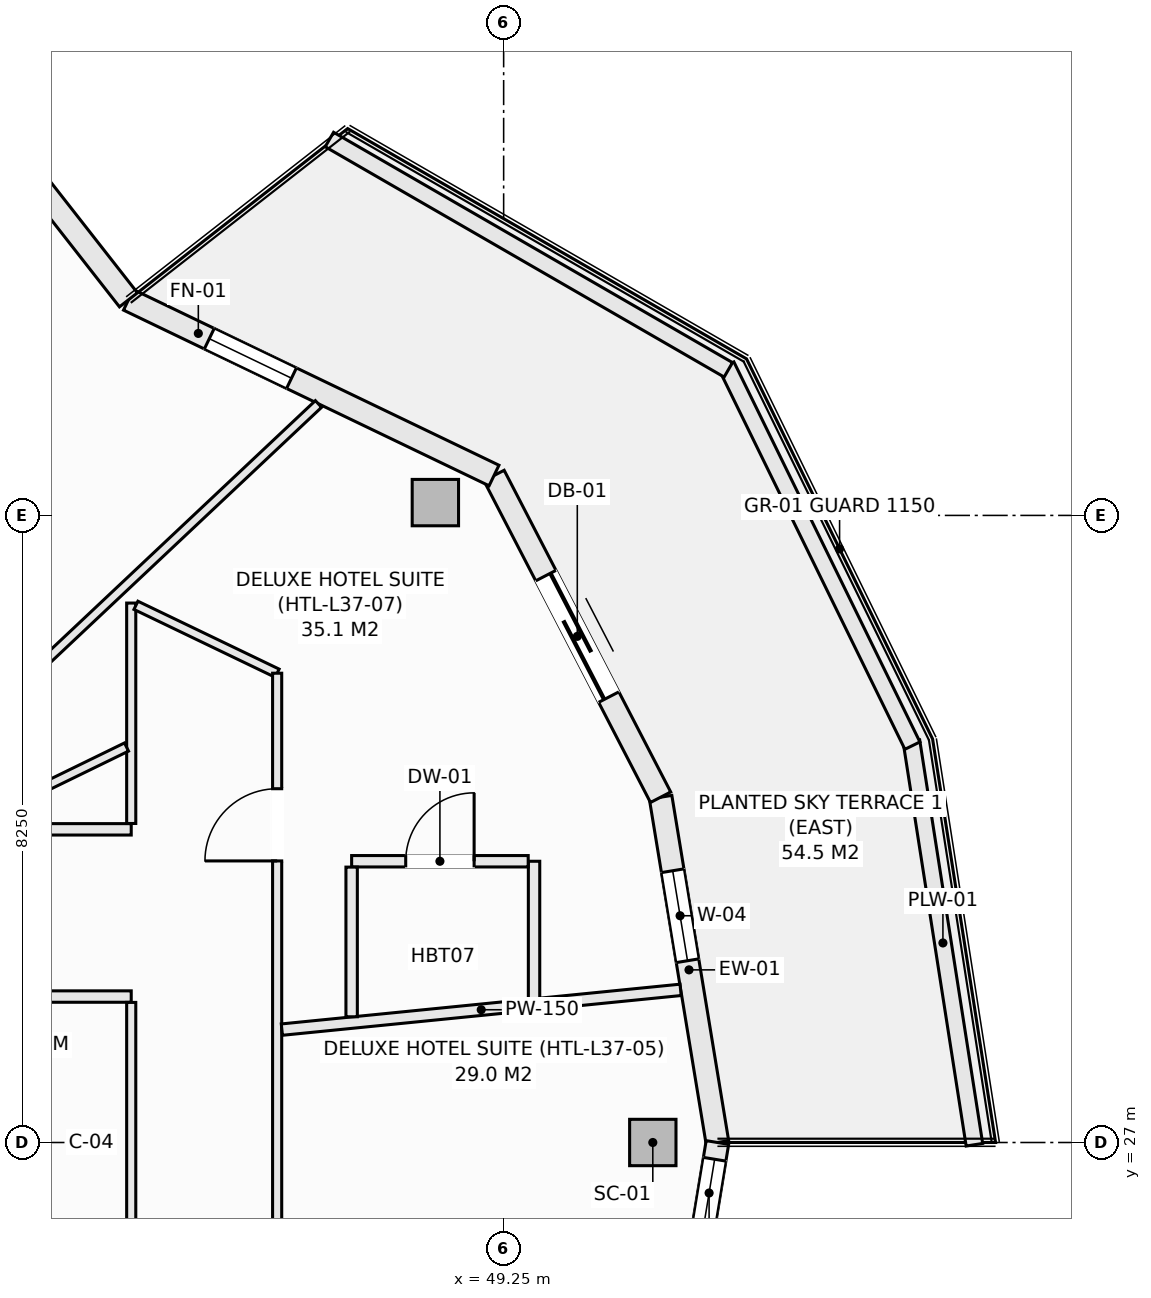
"""IFC4 building model, lengths in metres.
Left out: names, types, materials, properties, quantities, classifications, styles, units other than length and angle.
Written with IfcOpenShell. Run it as: python <this file> out.ifc"""

import sys

from ifc_helpers import new_model, si_unit, direction, frame, frame_2d, origin, origin_2d, place, context, subcontext, project, spatial, rectangle, hollow_rectangle, extrude, element, fill, save


model = new_model("IFC4")
c1 = context("Model", 3, precision=1e-05, world=origin(), true_north=direction((0.0, 1.0)))
c2 = subcontext(c1, "Body", "Model", "MODEL_VIEW")
j1 = project(units=[si_unit("LENGTHUNIT", "METRE"), si_unit("PLANEANGLEUNIT", "RADIAN")], contexts=[c1])
p1 = place(None, origin())
s1 = spatial("IfcSite", under=j1, at=p1, CompositionType="ELEMENT")
p2 = place(p1, origin())
s2 = spatial("IfcBuilding", under=s1, at=p2, CompositionType="ELEMENT")
p3 = place(p2, frame((0.0, 0.0, 146.1)))
s3 = spatial("IfcBuildingStorey", under=s2, at=p3, CompositionType="ELEMENT", Elevation=146.1)
for number, where, z_axis, x_axis in (
    (1, (51.212, 27.0, -0.27), (0.0, 0.0, 1.0), (1.0, 0.0, 0.0)),
    (2, (48.352, 35.419, -0.27), (0.0, 0.0, 1.0), (1.0, 0.0, 0.0)),
):
    element("IfcColumn", number, at=place(p3, frame(where, z_axis=z_axis, x_axis=x_axis)), inside=s3, PredefinedType="COLUMN", context=c2, shape_type="SweptSolid", body=[
        extrude(hollow_rectangle(XDim=0.61, YDim=0.61, WallThickness=0.025, at=origin_2d()), origin(), (0.0, 0.0, 1.0), 3.4),
    ])
p4 = place(p3, frame((51.315, 31.542, 0.0), z_axis=(0.0, 0.0, 1.0), x_axis=(0.162394765401, -0.986725868806, 0.0)))
e3 = element("IfcWall", 3, at=p4, inside=s3, PredefinedType="SOLIDWALL", context=c2, shape_type="SweptSolid", body=[
    extrude(rectangle(XDim=4.603, YDim=0.3, at=frame_2d((2.302, 0.0))), origin(), (0.0, 0.0, 1.0), 2.653),
])
p5 = place(p4, frame((0.98, 0.0, 0.72)))
e4 = element("IfcOpeningElement", 4, at=p5, cuts=e3, PredefinedType="OPENING", context=c2, shape_type="SweptSolid", body=[
    extrude(rectangle(XDim=1.2, YDim=1.65, at=frame_2d((0.6, 0.825))), frame((0.0, 0.16, 0.0), z_axis=(0.0, -1.0, 0.0), x_axis=(1.0, 0.0, 0.0)), (0.0, 0.0, 1.0), 0.32),
])
p6 = place(p3, frame((49.123, 35.775, 0.0), z_axis=(0.0, 0.0, 1.0), x_axis=(0.459810251451, -0.888017191647, 0.0)))
e5 = element("IfcWall", 5, at=p6, inside=s3, PredefinedType="SOLIDWALL", context=c2, shape_type="SweptSolid", body=[
    extrude(rectangle(XDim=4.766, YDim=0.3, at=frame_2d((2.383, 0.0))), origin(), (0.0, 0.0, 1.0), 2.653),
])
p7 = place(p6, frame((1.483, 0.0, 0.0)))
e6 = element("IfcOpeningElement", 6, at=p7, cuts=e5, PredefinedType="OPENING", context=c2, shape_type="SweptSolid", body=[
    extrude(rectangle(XDim=1.8, YDim=2.25, at=frame_2d((0.9, 1.125))), frame((0.0, 0.16, 0.0), z_axis=(0.0, -1.0, 0.0), x_axis=(1.0, 0.0, 0.0)), (0.0, 0.0, 1.0), 0.32),
])
p8 = place(p3, frame((44.313, 38.086, 0.0), z_axis=(0.0, 0.0, 1.0), x_axis=(0.901353070301, -0.433085029363, 0.0)))
e7 = element("IfcWall", 7, at=p8, inside=s3, PredefinedType="SOLIDWALL", context=c2, shape_type="SweptSolid", body=[
    extrude(rectangle(XDim=5.336, YDim=0.3, at=frame_2d((2.668, 0.0))), origin(), (0.0, 0.0, 1.0), 2.653),
])
p9 = place(p8, frame((1.18, 0.0, 0.72)))
e8 = element("IfcOpeningElement", 8, at=p9, cuts=e7, PredefinedType="OPENING", context=c2, shape_type="SweptSolid", body=[
    extrude(rectangle(XDim=1.2, YDim=1.65, at=frame_2d((0.6, 0.825))), frame((0.0, 0.16, 0.0), z_axis=(0.0, -1.0, 0.0), x_axis=(1.0, 0.0, 0.0)), (0.0, 0.0, 1.0), 0.32),
])
p10 = place(p3, frame((41.094, 42.199, 0.0), z_axis=(0.0, 0.0, 1.0), x_axis=(0.616429245738, -0.787410302828, 0.0)))
e9 = element("IfcWall", 9, at=p10, inside=s3, PredefinedType="SOLIDWALL", context=c2, shape_type="SweptSolid", body=[
    extrude(rectangle(XDim=5.223, YDim=0.3, at=frame_2d((2.612, 0.0))), origin(), (0.0, 0.0, 1.0), 2.653),
])
p11 = place(p10, frame((1.18, 0.0, 0.72)))
e10 = element("IfcOpeningElement", 10, at=p11, cuts=e9, PredefinedType="OPENING", context=c2, shape_type="SweptSolid", body=[
    extrude(rectangle(XDim=1.2, YDim=1.65, at=frame_2d((0.6, 0.825))), frame((0.0, 0.16, 0.0), z_axis=(0.0, -1.0, 0.0), x_axis=(1.0, 0.0, 0.0)), (0.0, 0.0, 1.0), 0.32),
])
p12 = place(p3, frame((51.315, 22.458, 0.0), z_axis=(0.0, 0.0, 1.0), x_axis=(0.162394765401, 0.986725868806, 0.0)))
e11 = element("IfcWall", 11, at=p12, inside=s3, PredefinedType="SOLIDWALL", context=c2, shape_type="SweptSolid", body=[
    extrude(rectangle(XDim=4.603, YDim=0.3, at=frame_2d((2.302, 0.0))), origin(), (0.0, 0.0, 1.0), 2.653),
])
p13 = place(p12, frame((1.68, 0.0, 0.74)))
e12 = element("IfcOpeningElement", 12, at=p13, cuts=e11, PredefinedType="OPENING", context=c2, shape_type="SweptSolid", body=[
    extrude(rectangle(XDim=1.2, YDim=1.7, at=frame_2d((0.6, 0.85))), frame((0.0, 0.16, 0.0), z_axis=(0.0, -1.0, 0.0), x_axis=(1.0, 0.0, 0.0)), (0.0, 0.0, 1.0), 0.32),
])
p14 = place(p12, frame((3.48, 0.0, 0.72)))
e13 = element("IfcOpeningElement", 13, at=p14, cuts=e11, PredefinedType="OPENING", context=c2, shape_type="SweptSolid", body=[
    extrude(rectangle(XDim=0.9, YDim=1.65, at=frame_2d((0.45, 0.825))), frame((0.0, 0.16, 0.0), z_axis=(0.0, -1.0, 0.0), x_axis=(1.0, 0.0, 0.0)), (0.0, 0.0, 1.0), 0.32),
])
p15 = place(p3, frame((54.615, 32.28, 0.0), z_axis=(0.0, 0.0, 1.0), x_axis=(0.154245214003, -0.988032597619, 0.0)))
e14 = element("IfcWall", 14, at=p15, inside=s3, PredefinedType="PARAPET", context=c2, shape_type="SweptSolid", body=[
    extrude(rectangle(XDim=5.374, YDim=0.22, at=frame_2d((2.687, 0.0))), origin(), (0.0, 0.0, 1.0), 0.52),
])
p16 = place(p3, frame((52.18, 37.221, 0.0), z_axis=(0.0, 0.0, 1.0), x_axis=(0.439637174641, -0.898175458735, 0.0)))
e15 = element("IfcWall", 15, at=p16, inside=s3, PredefinedType="PARAPET", context=c2, shape_type="SweptSolid", body=[
    extrude(rectangle(XDim=5.567, YDim=0.22, at=frame_2d((2.784, 0.0))), origin(), (0.0, 0.0, 1.0), 0.52),
])
p17 = place(p3, frame((46.958, 40.195, 0.0), z_axis=(0.0, 0.0, 1.0), x_axis=(0.866058128659, -0.499943314571, 0.0)))
e16 = element("IfcWall", 16, at=p17, inside=s3, PredefinedType="PARAPET", context=c2, shape_type="SweptSolid", body=[
    extrude(rectangle(XDim=6.06, YDim=0.22, at=frame_2d((3.03, 0.0))), origin(), (0.0, 0.0, 1.0), 0.52),
])
p18 = place(p3, frame((30.077, 28.92, 0.0), z_axis=(0.0, 0.0, 1.0), x_axis=(1.0, 0.0, 0.0)))
e17 = element("IfcWall", 17, at=p18, inside=s3, PredefinedType="PARTITIONING", context=c2, shape_type="SweptSolid", body=[
    extrude(rectangle(XDim=14.273, YDim=0.15, at=frame_2d((7.137, 0.0))), origin(), (0.0, 0.0, 1.0), 3.13),
])
p19 = place(p3, frame((38.862, 31.12, 0.0), z_axis=(0.0, 0.0, 1.0), x_axis=(1.0, 0.0, 0.0)))
e18 = element("IfcWall", 18, at=p19, inside=s3, PredefinedType="PARTITIONING", context=c2, shape_type="SweptSolid", body=[
    extrude(rectangle(XDim=5.488, YDim=0.15, at=frame_2d((2.744, 0.0))), origin(), (0.0, 0.0, 1.0), 3.13),
])
p20 = place(p3, frame((44.35, 25.197, 0.0), z_axis=(0.0, 0.0, 1.0), x_axis=(0.0, 1.0, 0.0)))
e19 = element("IfcWall", 19, at=p20, inside=s3, PredefinedType="PARTITIONING", context=c2, shape_type="SweptSolid", body=[
    extrude(rectangle(XDim=3.646, YDim=0.12, at=frame_2d((1.823, 0.0))), origin(), (0.0, 0.0, 1.0), 3.13),
])
p21 = place(p3, frame((44.35, 31.197, 0.0), z_axis=(0.0, 0.0, 1.0), x_axis=(0.0, 1.0, 0.0)))
e20 = element("IfcWall", 20, at=p21, inside=s3, PredefinedType="PARTITIONING", context=c2, shape_type="SweptSolid", body=[
    extrude(rectangle(XDim=2.9, YDim=0.12, at=frame_2d((1.45, 0.0))), origin(), (0.0, 0.0, 1.0), 3.13),
])
p22 = place(p3, frame((44.412, 34.067, 0.0), z_axis=(0.0, 0.0, 1.0), x_axis=(0.90128266231, -0.433231534656, 0.0)))
e21 = element("IfcWall", 21, at=p22, inside=s3, PredefinedType="PARTITIONING", context=c2, shape_type="SweptSolid", body=[
    extrude(rectangle(XDim=2.062, YDim=0.12, at=frame_2d((1.031, 0.0))), origin(), (0.0, 0.0, 1.0), 3.13),
])
p23 = place(p3, frame((46.27, 20.826, 0.0), z_axis=(0.0, 0.0, 1.0), x_axis=(0.0, 1.0, 0.0)))
e22 = element("IfcWall", 22, at=p23, inside=s3, PredefinedType="PARTITIONING", context=c2, shape_type="SweptSolid", body=[
    extrude(rectangle(XDim=12.348, YDim=0.12, at=frame_2d((6.174, 0.0))), origin(), (0.0, 0.0, 1.0), 3.13),
])
p24 = place(p23, frame((3.556, 0.0, 0.0)))
e23 = element("IfcOpeningElement", 23, at=p24, cuts=e22, PredefinedType="OPENING", context=c2, shape_type="SweptSolid", body=[
    extrude(rectangle(XDim=0.95, YDim=2.1, at=frame_2d((0.475, 1.05))), frame((0.0, 0.07, 0.0), z_axis=(0.0, -1.0, 0.0), x_axis=(1.0, 0.0, 0.0)), (0.0, 0.0, 1.0), 0.14),
])
p25 = place(p23, frame((9.878, 0.0, 0.0)))
e24 = element("IfcOpeningElement", 24, at=p25, cuts=e22, PredefinedType="OPENING", context=c2, shape_type="SweptSolid", body=[
    extrude(rectangle(XDim=0.95, YDim=2.1, at=frame_2d((0.475, 1.05))), frame((0.0, 0.07, 0.0), z_axis=(0.0, -1.0, 0.0), x_axis=(1.0, 0.0, 0.0)), (0.0, 0.0, 1.0), 0.14),
])
p26 = place(p3, frame((46.332, 28.485, 0.0), z_axis=(0.0, 0.0, 1.0), x_axis=(0.995067863433, 0.099196507817, 0.0)))
e25 = element("IfcWall", 25, at=p26, inside=s3, PredefinedType="PARTITIONING", context=c2, shape_type="SweptSolid", body=[
    extrude(rectangle(XDim=5.272, YDim=0.15, at=frame_2d((2.636, 0.0))), origin(), (0.0, 0.0, 1.0), 3.13),
])
p27 = place(p3, frame((49.65, 28.893, 0.0), z_axis=(0.0, 0.0, 1.0), x_axis=(0.0, 1.0, 0.0)))
e26 = element("IfcWall", 26, at=p27, inside=s3, PredefinedType="PARTITIONING", context=c2, shape_type="SweptSolid", body=[
    extrude(rectangle(XDim=1.807, YDim=0.15, at=frame_2d((0.903, 0.0))), origin(), (0.0, 0.0, 1.0), 3.13),
])
p28 = place(p3, frame((47.25, 30.7, 0.0), z_axis=(0.0, 0.0, 1.0), x_axis=(1.0, 0.0, 0.0)))
e27 = element("IfcWall", 27, at=p28, inside=s3, PredefinedType="PARTITIONING", context=c2, shape_type="SweptSolid", body=[
    extrude(rectangle(XDim=2.323, YDim=0.15, at=frame_2d((1.162, 0.0))), origin(), (0.0, 0.0, 1.0), 3.13),
])
p29 = place(p28, frame((0.711, 0.0, 0.0)))
e28 = element("IfcOpeningElement", 28, at=p29, cuts=e27, PredefinedType="OPENING", context=c2, shape_type="SweptSolid", body=[
    extrude(rectangle(XDim=0.9, YDim=2.1, at=frame_2d((0.45, 1.05))), frame((0.0, 0.085, 0.0), z_axis=(0.0, -1.0, 0.0), x_axis=(1.0, 0.0, 0.0)), (0.0, 0.0, 1.0), 0.17),
])
p30 = place(p3, frame((47.25, 28.654, 0.0), z_axis=(0.0, 0.0, 1.0), x_axis=(0.0, 1.0, 0.0)))
e29 = element("IfcWall", 29, at=p30, inside=s3, PredefinedType="PARTITIONING", context=c2, shape_type="SweptSolid", body=[
    extrude(rectangle(XDim=1.969, YDim=0.15, at=frame_2d((0.984, 0.0))), origin(), (0.0, 0.0, 1.0), 3.13),
])
p31 = place(p3, frame((42.225, 31.197, 0.0), z_axis=(0.0, 0.0, 1.0), x_axis=(0.898870643835, 0.438214063732, 0.0)))
e30 = element("IfcWall", 30, at=p31, inside=s3, PredefinedType="PARTITIONING", context=c2, shape_type="SweptSolid", body=[
    extrude(rectangle(XDim=2.295, YDim=0.12, at=frame_2d((1.148, 0.0))), origin(), (0.0, 0.0, 1.0), 3.13),
])
p32 = place(p3, frame((40.949, 31.197, 0.0), z_axis=(0.0, 0.0, 1.0), x_axis=(0.728258728927, 0.685302286397, 0.0)))
e31 = element("IfcWall", 31, at=p32, inside=s3, PredefinedType="PARTITIONING", context=c2, shape_type="SweptSolid", body=[
    extrude(rectangle(XDim=8.053, YDim=0.12, at=frame_2d((4.027, 0.0))), origin(), (0.0, 0.0, 1.0), 2.812),
])
p33 = place(p5, origin())
e32 = element("IfcWindow", 32, at=p33, inside=s3, PartitioningType="SINGLE_PANEL", PredefinedType="WINDOW", context=c2, shape_type="SweptSolid", body=[
    extrude(rectangle(XDim=1.2, YDim=1.65, at=frame_2d((0.6, 0.825))), frame((0.0, 0.03, 0.0), z_axis=(0.0, -1.0, 0.0), x_axis=(1.0, 0.0, 0.0)), (0.0, 0.0, 1.0), 0.06),
])
fill(e4, e32)
p34 = place(p7, origin())
e33 = element("IfcDoor", 33, at=p34, inside=s3, OperationType="SLIDING_TO_LEFT", PredefinedType="DOOR", context=c2, shape_type="SweptSolid", body=[
    extrude(rectangle(XDim=1.8, YDim=2.25, at=frame_2d((0.9, 1.125))), frame((0.0, 0.025, 0.0), z_axis=(0.0, -1.0, 0.0), x_axis=(1.0, 0.0, 0.0)), (0.0, 0.0, 1.0), 0.05),
])
fill(e6, e33)
p35 = place(p9, origin())
e34 = element("IfcWindow", 34, at=p35, inside=s3, PartitioningType="SINGLE_PANEL", PredefinedType="WINDOW", context=c2, shape_type="SweptSolid", body=[
    extrude(rectangle(XDim=1.2, YDim=1.65, at=frame_2d((0.6, 0.825))), frame((0.0, 0.03, 0.0), z_axis=(0.0, -1.0, 0.0), x_axis=(1.0, 0.0, 0.0)), (0.0, 0.0, 1.0), 0.06),
])
fill(e8, e34)
p36 = place(p25, origin())
e35 = element("IfcDoor", 35, at=p36, inside=s3, OperationType="SINGLE_SWING_LEFT", PredefinedType="DOOR", context=c2, shape_type="SweptSolid", body=[
    extrude(rectangle(XDim=0.95, YDim=2.1, at=frame_2d((0.475, 1.05))), frame((0.0, 0.025, 0.0), z_axis=(0.0, -1.0, 0.0), x_axis=(1.0, 0.0, 0.0)), (0.0, 0.0, 1.0), 0.05),
])
fill(e24, e35)
p37 = place(p29, origin())
e36 = element("IfcDoor", 36, at=p37, inside=s3, OperationType="SINGLE_SWING_RIGHT", PredefinedType="DOOR", context=c2, shape_type="SweptSolid", body=[
    extrude(rectangle(XDim=0.9, YDim=2.1, at=frame_2d((0.45, 1.05))), frame((0.0, 0.025, 0.0), z_axis=(0.0, -1.0, 0.0), x_axis=(1.0, 0.0, 0.0)), (0.0, 0.0, 1.0), 0.05),
])
fill(e28, e36)
p38 = place(p14, origin())
e37 = element("IfcWindow", 37, at=p38, inside=s3, PartitioningType="SINGLE_PANEL", PredefinedType="WINDOW", context=c2, shape_type="SweptSolid", body=[
    extrude(rectangle(XDim=0.9, YDim=1.65, at=frame_2d((0.45, 0.825))), frame((0.0, 0.03, 0.0), z_axis=(0.0, -1.0, 0.0), x_axis=(1.0, 0.0, 0.0)), (0.0, 0.0, 1.0), 0.06),
])
fill(e13, e37)
save(model, sys.argv[1])
